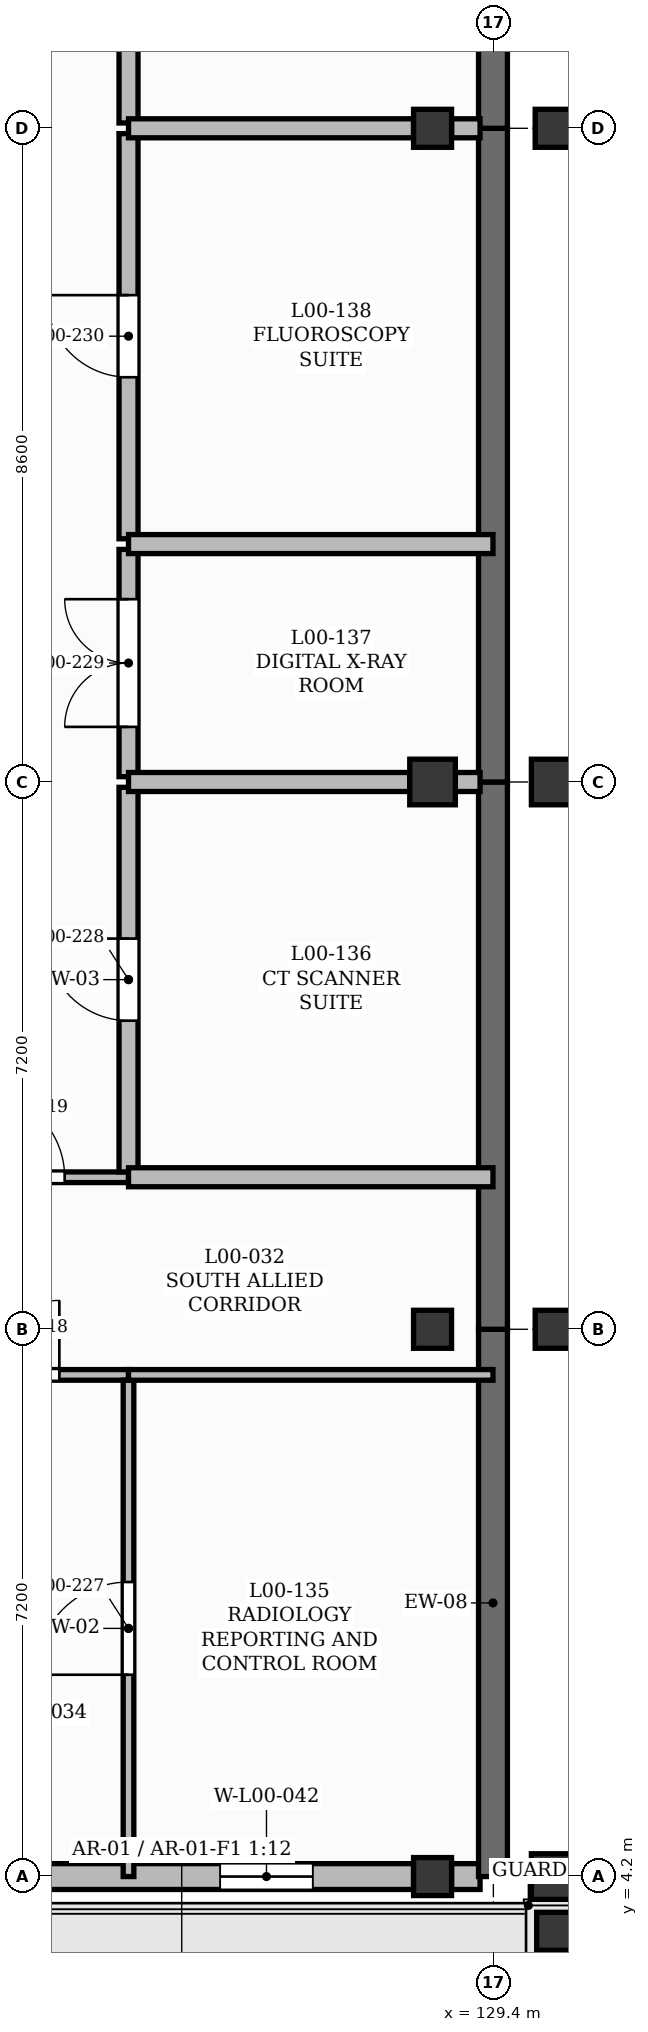
"""IFC4 building model, lengths in metres.
Left out: names, types, materials, properties, quantities, classifications, styles, units other than length and angle.
Written with IfcOpenShell. Run it as: python <this file> out.ifc"""

import sys

from ifc_helpers import new_model, si_unit, direction, frame, frame_2d, origin, origin_2d, place, context, subcontext, project, spatial, rectangle, extrude, element, fill, save


model = new_model("IFC4")
c1 = context("Model", 3, precision=1e-05, world=origin(), true_north=direction((0.0, 1.0)))
c2 = subcontext(c1, "Body", "Model", "MODEL_VIEW")
j1 = project(units=[si_unit("LENGTHUNIT", "METRE"), si_unit("PLANEANGLEUNIT", "RADIAN")], contexts=[c1])
p1 = place(None, origin())
s1 = spatial("IfcSite", under=j1, at=p1, CompositionType="ELEMENT")
p2 = place(p1, origin())
s2 = spatial("IfcBuilding", under=s1, at=p2, CompositionType="ELEMENT")
p3 = place(p2, origin())
s3 = spatial("IfcBuildingStorey", under=s2, at=p3, CompositionType="ELEMENT", Elevation=0.0)
for number, where, z_axis, x_axis in (
    (1, (128.6, 4.2, 0.0), (0.0, 0.0, 1.0), (1.0, 0.0, 0.0)),
    (2, (128.6, 11.4, 0.0), (0.0, 0.0, 1.0), (1.0, 0.0, 0.0)),
):
    element("IfcColumn", number, at=place(p3, frame(where, z_axis=z_axis, x_axis=x_axis)), inside=s3, PredefinedType="COLUMN", context=c2, shape_type="SweptSolid", body=[
        extrude(rectangle(XDim=0.5, YDim=0.5, at=origin_2d()), origin(), (0.0, 0.0, 1.0), 4.2),
    ])
p4 = place(p3, frame((128.6, 18.6, 0.0), z_axis=(0.0, 0.0, 1.0), x_axis=(1.0, 0.0, 0.0)))
e3 = element("IfcColumn", 3, at=p4, inside=s3, PredefinedType="COLUMN", context=c2, shape_type="SweptSolid", body=[
    extrude(rectangle(XDim=0.6, YDim=0.6, at=origin_2d()), origin(), (0.0, 0.0, 1.0), 4.2),
])
p5 = place(p3, frame((128.6, 27.2, 0.0), z_axis=(0.0, 0.0, 1.0), x_axis=(1.0, 0.0, 0.0)))
e4 = element("IfcColumn", 4, at=p5, inside=s3, PredefinedType="COLUMN", context=c2, shape_type="SweptSolid", body=[
    extrude(rectangle(XDim=0.5, YDim=0.5, at=origin_2d()), origin(), (0.0, 0.0, 1.0), 4.2),
])
p6 = place(p3, frame((130.2, 4.2, -0.4), z_axis=(0.0, 0.0, 1.0), x_axis=(1.0, 0.0, 0.0)))
e5 = element("IfcColumn", 5, at=p6, inside=s3, PredefinedType="COLUMN", context=c2, shape_type="SweptSolid", body=[
    extrude(rectangle(XDim=0.6, YDim=0.6, at=origin_2d()), origin(), (0.0, 0.0, 1.0), 4.5),
])
p7 = place(p3, frame((130.2, 11.4, -0.4), z_axis=(0.0, 0.0, 1.0), x_axis=(1.0, 0.0, 0.0)))
e6 = element("IfcColumn", 6, at=p7, inside=s3, PredefinedType="COLUMN", context=c2, shape_type="SweptSolid", body=[
    extrude(rectangle(XDim=0.5, YDim=0.5, at=origin_2d()), origin(), (0.0, 0.0, 1.0), 4.5),
])
p8 = place(p3, frame((130.2, 18.6, -0.4), z_axis=(0.0, 0.0, 1.0), x_axis=(1.0, 0.0, 0.0)))
e7 = element("IfcColumn", 7, at=p8, inside=s3, PredefinedType="COLUMN", context=c2, shape_type="SweptSolid", body=[
    extrude(rectangle(XDim=0.6, YDim=0.6, at=origin_2d()), origin(), (0.0, 0.0, 1.0), 4.5),
])
p9 = place(p3, frame((130.2, 27.2, -0.4), z_axis=(0.0, 0.0, 1.0), x_axis=(1.0, 0.0, 0.0)))
e8 = element("IfcColumn", 8, at=p9, inside=s3, PredefinedType="COLUMN", context=c2, shape_type="SweptSolid", body=[
    extrude(rectangle(XDim=0.5, YDim=0.5, at=origin_2d()), origin(), (0.0, 0.0, 1.0), 4.5),
])
p10 = place(p3, frame((130.22, 3.48, -1.6), z_axis=(0.0, 0.0, 1.0), x_axis=(1.0, 0.0, 0.0)))
e9 = element("IfcColumn", 9, at=p10, inside=s3, PredefinedType="COLUMN", context=c2, shape_type="SweptSolid", body=[
    extrude(rectangle(XDim=0.5, YDim=0.5, at=origin_2d()), origin(), (0.0, 0.0, 1.0), 2.1),
])
p11 = place(p3, frame((122.5, 4.2, 0.0), z_axis=(0.0, 0.0, 1.0), x_axis=(1.0, 0.0, 0.0)))
e10 = element("IfcWall", 10, at=p11, inside=s3, PredefinedType="SOLIDWALL", context=c2, shape_type="SweptSolid", body=[
    extrude(rectangle(XDim=5.85, YDim=0.34, at=frame_2d((2.925, 0.0))), origin(), (0.0, 0.0, 1.0), 3.68),
])
p12 = place(p11, frame((3.305, 0.0, 1.0)))
e11 = element("IfcOpeningElement", 11, at=p12, cuts=e10, PredefinedType="OPENING", context=c2, shape_type="SweptSolid", body=[
    extrude(rectangle(XDim=1.22, YDim=2.2, at=frame_2d((0.61, 1.1))), frame((0.0, 0.18, 0.0), z_axis=(0.0, -1.0, 0.0), x_axis=(1.0, 0.0, 0.0)), (0.0, 0.0, 1.0), 0.36),
])
p13 = place(p3, frame((128.85, 4.2, 0.0), z_axis=(0.0, 0.0, 1.0), x_axis=(1.0, 0.0, 0.0)))
e12 = element("IfcWall", 12, at=p13, inside=s3, PredefinedType="SOLIDWALL", context=c2, shape_type="SweptSolid", body=[
    extrude(rectangle(XDim=0.375, YDim=0.34, at=frame_2d((0.188, 0.0))), origin(), (0.0, 0.0, 1.0), 4.2),
])
p14 = place(p3, frame((129.395, 4.2, 0.0), z_axis=(0.0, 0.0, 1.0), x_axis=(0.0, 1.0, 0.0)))
e13 = element("IfcWall", 13, at=p14, inside=s3, PredefinedType="USERDEFINED", context=c2, shape_type="SweptSolid", body=[
    extrude(rectangle(XDim=7.2, YDim=0.38, at=frame_2d((3.6, 0.0))), origin(), (0.0, 0.0, 1.0), 4.2),
])
p15 = place(p3, frame((129.395, 11.4, 0.0), z_axis=(0.0, 0.0, 1.0), x_axis=(0.0, 1.0, 0.0)))
e14 = element("IfcWall", 14, at=p15, inside=s3, PredefinedType="USERDEFINED", context=c2, shape_type="SweptSolid", body=[
    extrude(rectangle(XDim=7.2, YDim=0.38, at=frame_2d((3.6, 0.0))), origin(), (0.0, 0.0, 1.0), 4.2),
])
p16 = place(p3, frame((129.395, 18.6, 0.0), z_axis=(0.0, 0.0, 1.0), x_axis=(0.0, 1.0, 0.0)))
e15 = element("IfcWall", 15, at=p16, inside=s3, PredefinedType="USERDEFINED", context=c2, shape_type="SweptSolid", body=[
    extrude(rectangle(XDim=8.6, YDim=0.38, at=frame_2d((4.3, 0.0))), origin(), (0.0, 0.0, 1.0), 4.2),
])
p17 = place(p3, frame((129.395, 27.2, 0.0), z_axis=(0.0, 0.0, 1.0), x_axis=(0.0, 1.0, 0.0)))
e16 = element("IfcWall", 16, at=p17, inside=s3, PredefinedType="USERDEFINED", context=c2, shape_type="SweptSolid", body=[
    extrude(rectangle(XDim=9.6, YDim=0.38, at=frame_2d((4.8, 0.0))), origin(), (0.0, 0.0, 1.0), 4.2),
])
p18 = place(p3, frame((121.8, 10.8, 0.0), z_axis=(0.0, 0.0, 1.0), x_axis=(1.0, 0.0, 0.0)))
e17 = element("IfcWall", 17, at=p18, inside=s3, PredefinedType="PARTITIONING", context=c2, shape_type="SweptSolid", body=[
    extrude(rectangle(XDim=2.8, YDim=0.14, at=frame_2d((1.4, 0.0))), origin(), (0.0, 0.0, 1.0), 4.18),
])
p19 = place(p18, frame((0.91, 0.0, 0.0)))
e18 = element("IfcOpeningElement", 18, at=p19, cuts=e17, PredefinedType="OPENING", context=c2, shape_type="SweptSolid", body=[
    extrude(rectangle(XDim=0.98, YDim=2.15, at=frame_2d((0.49, 1.075))), frame((0.0, 0.08, 0.0), z_axis=(0.0, -1.0, 0.0), x_axis=(1.0, 0.0, 0.0)), (0.0, 0.0, 1.0), 0.16),
])
p20 = place(p3, frame((121.8, 13.4, 0.0), z_axis=(0.0, 0.0, 1.0), x_axis=(1.0, 0.0, 0.0)))
e19 = element("IfcWall", 19, at=p20, inside=s3, PredefinedType="PARTITIONING", context=c2, shape_type="SweptSolid", body=[
    extrude(rectangle(XDim=2.8, YDim=0.14, at=frame_2d((1.4, 0.0))), origin(), (0.0, 0.0, 1.0), 4.18),
])
p21 = place(p20, frame((0.84, 0.0, 0.0)))
e20 = element("IfcOpeningElement", 20, at=p21, cuts=e19, PredefinedType="OPENING", context=c2, shape_type="SweptSolid", body=[
    extrude(rectangle(XDim=1.12, YDim=2.15, at=frame_2d((0.56, 1.075))), frame((0.0, 0.08, 0.0), z_axis=(0.0, -1.0, 0.0), x_axis=(1.0, 0.0, 0.0)), (0.0, 0.0, 1.0), 0.16),
])
p22 = place(p3, frame((124.6, 4.2, 0.0), z_axis=(0.0, 0.0, 1.0), x_axis=(0.0, 1.0, 0.0)))
e21 = element("IfcWall", 21, at=p22, inside=s3, PredefinedType="PARTITIONING", context=c2, shape_type="SweptSolid", body=[
    extrude(rectangle(XDim=6.53, YDim=0.14, at=frame_2d((3.265, 0.0))), origin(), (0.0, 0.0, 1.0), 4.18),
])
p23 = place(p22, frame((2.655, 0.0, 0.0)))
e22 = element("IfcOpeningElement", 22, at=p23, cuts=e21, PredefinedType="OPENING", context=c2, shape_type="SweptSolid", body=[
    extrude(rectangle(XDim=1.22, YDim=2.1, at=frame_2d((0.61, 1.05))), frame((0.0, 0.08, 0.0), z_axis=(0.0, -1.0, 0.0), x_axis=(1.0, 0.0, 0.0)), (0.0, 0.0, 1.0), 0.16),
])
p24 = place(p3, frame((124.6, 10.8, 0.0), z_axis=(0.0, 0.0, 1.0), x_axis=(1.0, 0.0, 0.0)))
e23 = element("IfcWall", 23, at=p24, inside=s3, PredefinedType="PARTITIONING", context=c2, shape_type="SweptSolid", body=[
    extrude(rectangle(XDim=4.795, YDim=0.14, at=frame_2d((2.397, 0.0))), origin(), (0.0, 0.0, 1.0), 4.18),
])
p25 = place(p3, frame((124.6, 13.47, 0.0), z_axis=(0.0, 0.0, 1.0), x_axis=(0.0, 1.0, 0.0)))
e24 = element("IfcWall", 24, at=p25, inside=s3, PredefinedType="SOLIDWALL", context=c2, shape_type="SweptSolid", body=[
    extrude(rectangle(XDim=5.06, YDim=0.25, at=frame_2d((2.53, 0.0))), origin(), (0.0, 0.0, 1.0), 4.18),
])
p26 = place(p25, frame((1.99, 0.0, 0.0)))
e25 = element("IfcOpeningElement", 25, at=p26, cuts=e24, PredefinedType="OPENING", context=c2, shape_type="SweptSolid", body=[
    extrude(rectangle(XDim=1.08, YDim=2.15, at=frame_2d((0.54, 1.075))), frame((0.0, 0.135, 0.0), z_axis=(0.0, -1.0, 0.0), x_axis=(1.0, 0.0, 0.0)), (0.0, 0.0, 1.0), 0.27),
])
p27 = place(p3, frame((124.6, 13.4, 0.0), z_axis=(0.0, 0.0, 1.0), x_axis=(1.0, 0.0, 0.0)))
e26 = element("IfcWall", 26, at=p27, inside=s3, PredefinedType="SOLIDWALL", context=c2, shape_type="SweptSolid", body=[
    extrude(rectangle(XDim=4.795, YDim=0.25, at=frame_2d((2.397, 0.0))), origin(), (0.0, 0.0, 1.0), 4.18),
])
p28 = place(p3, frame((124.6, 18.67, 0.0), z_axis=(0.0, 0.0, 1.0), x_axis=(0.0, 1.0, 0.0)))
e27 = element("IfcWall", 27, at=p28, inside=s3, PredefinedType="SOLIDWALL", context=c2, shape_type="SweptSolid", body=[
    extrude(rectangle(XDim=2.99, YDim=0.25, at=frame_2d((1.495, 0.0))), origin(), (0.0, 0.0, 1.0), 4.18),
])
p29 = place(p28, frame((0.655, 0.0, 0.0)))
e28 = element("IfcOpeningElement", 28, at=p29, cuts=e27, PredefinedType="OPENING", context=c2, shape_type="SweptSolid", body=[
    extrude(rectangle(XDim=1.68, YDim=2.3, at=frame_2d((0.84, 1.15))), frame((0.0, 0.135, 0.0), z_axis=(0.0, -1.0, 0.0), x_axis=(1.0, 0.0, 0.0)), (0.0, 0.0, 1.0), 0.27),
])
p30 = place(p3, frame((124.6, 18.6, 0.0), z_axis=(0.0, 0.0, 1.0), x_axis=(1.0, 0.0, 0.0)))
e29 = element("IfcWall", 29, at=p30, inside=s3, PredefinedType="SOLIDWALL", context=c2, shape_type="SweptSolid", body=[
    extrude(rectangle(XDim=3.7, YDim=0.25, at=frame_2d((1.85, 0.0))), origin(), (0.0, 0.0, 1.0), 3.25),
])
p31 = place(p3, frame((128.9, 18.6, 0.0), z_axis=(0.0, 0.0, 1.0), x_axis=(1.0, 0.0, 0.0)))
e30 = element("IfcWall", 30, at=p31, inside=s3, PredefinedType="SOLIDWALL", context=c2, shape_type="SweptSolid", body=[
    extrude(rectangle(XDim=0.325, YDim=0.25, at=frame_2d((0.163, 0.0))), origin(), (0.0, 0.0, 1.0), 4.18),
])
p32 = place(p3, frame((124.6, 21.8, 0.0), z_axis=(0.0, 0.0, 1.0), x_axis=(0.0, 1.0, 0.0)))
e31 = element("IfcWall", 31, at=p32, inside=s3, PredefinedType="SOLIDWALL", context=c2, shape_type="SweptSolid", body=[
    extrude(rectangle(XDim=5.33, YDim=0.25, at=frame_2d((2.665, 0.0))), origin(), (0.0, 0.0, 1.0), 4.18),
])
p33 = place(p32, frame((2.125, 0.0, 0.0)))
e32 = element("IfcOpeningElement", 32, at=p33, cuts=e31, PredefinedType="OPENING", context=c2, shape_type="SweptSolid", body=[
    extrude(rectangle(XDim=1.08, YDim=2.15, at=frame_2d((0.54, 1.075))), frame((0.0, 0.135, 0.0), z_axis=(0.0, -1.0, 0.0), x_axis=(1.0, 0.0, 0.0)), (0.0, 0.0, 1.0), 0.27),
])
p34 = place(p3, frame((124.6, 21.73, 0.0), z_axis=(0.0, 0.0, 1.0), x_axis=(1.0, 0.0, 0.0)))
e33 = element("IfcWall", 33, at=p34, inside=s3, PredefinedType="SOLIDWALL", context=c2, shape_type="SweptSolid", body=[
    extrude(rectangle(XDim=4.795, YDim=0.25, at=frame_2d((2.397, 0.0))), origin(), (0.0, 0.0, 1.0), 4.18),
])
p35 = place(p3, frame((124.6, 27.27, 0.0), z_axis=(0.0, 0.0, 1.0), x_axis=(0.0, 1.0, 0.0)))
e34 = element("IfcWall", 34, at=p35, inside=s3, PredefinedType="SOLIDWALL", context=c2, shape_type="SweptSolid", body=[
    extrude(rectangle(XDim=5.476, YDim=0.25, at=frame_2d((2.738, 0.0))), origin(), (0.0, 0.0, 1.0), 4.18),
])
p36 = place(p35, frame((1.898, 0.0, 0.0)))
e35 = element("IfcOpeningElement", 35, at=p36, cuts=e34, PredefinedType="OPENING", context=c2, shape_type="SweptSolid", body=[
    extrude(rectangle(XDim=1.68, YDim=2.3, at=frame_2d((0.84, 1.15))), frame((0.0, 0.135, 0.0), z_axis=(0.0, -1.0, 0.0), x_axis=(1.0, 0.0, 0.0)), (0.0, 0.0, 1.0), 0.27),
])
p37 = place(p3, frame((124.6, 27.2, 0.0), z_axis=(0.0, 0.0, 1.0), x_axis=(1.0, 0.0, 0.0)))
e36 = element("IfcWall", 36, at=p37, inside=s3, PredefinedType="SOLIDWALL", context=c2, shape_type="SweptSolid", body=[
    extrude(rectangle(XDim=3.75, YDim=0.25, at=frame_2d((1.875, 0.0))), origin(), (0.0, 0.0, 1.0), 3.6),
])
p38 = place(p3, frame((128.85, 27.2, 0.0), z_axis=(0.0, 0.0, 1.0), x_axis=(1.0, 0.0, 0.0)))
e37 = element("IfcWall", 37, at=p38, inside=s3, PredefinedType="SOLIDWALL", context=c2, shape_type="SweptSolid", body=[
    extrude(rectangle(XDim=0.375, YDim=0.25, at=frame_2d((0.188, 0.0))), origin(), (0.0, 0.0, 1.0), 4.18),
])
p39 = place(p12, origin())
e38 = element("IfcWindow", 38, at=p39, inside=s3, PartitioningType="SINGLE_PANEL", PredefinedType="WINDOW", context=c2, shape_type="SweptSolid", body=[
    extrude(rectangle(XDim=1.22, YDim=2.2, at=frame_2d((0.61, 1.1))), frame((0.0, 0.03, 0.0), z_axis=(0.0, -1.0, 0.0), x_axis=(1.0, 0.0, 0.0)), (0.0, 0.0, 1.0), 0.06),
])
fill(e11, e38)
p40 = place(p19, origin())
e39 = element("IfcDoor", 39, at=p40, inside=s3, OperationType="SINGLE_SWING_RIGHT", PredefinedType="DOOR", context=c2, shape_type="SweptSolid", body=[
    extrude(rectangle(XDim=0.98, YDim=2.15, at=frame_2d((0.49, 1.075))), frame((0.0, 0.025, 0.0), z_axis=(0.0, -1.0, 0.0), x_axis=(1.0, 0.0, 0.0)), (0.0, 0.0, 1.0), 0.05),
])
fill(e18, e39)
p41 = place(p21, origin())
e40 = element("IfcDoor", 40, at=p41, inside=s3, OperationType="SINGLE_SWING_LEFT", PredefinedType="DOOR", context=c2, shape_type="SweptSolid", body=[
    extrude(rectangle(XDim=1.12, YDim=2.15, at=frame_2d((0.56, 1.075))), frame((0.0, 0.025, 0.0), z_axis=(0.0, -1.0, 0.0), x_axis=(1.0, 0.0, 0.0)), (0.0, 0.0, 1.0), 0.05),
])
fill(e20, e40)
p42 = place(p23, origin())
e41 = element("IfcDoor", 41, at=p42, inside=s3, OperationType="SINGLE_SWING_LEFT", PredefinedType="DOOR", context=c2, shape_type="SweptSolid", body=[
    extrude(rectangle(XDim=1.22, YDim=2.1, at=frame_2d((0.61, 1.05))), frame((0.0, 0.025, 0.0), z_axis=(0.0, -1.0, 0.0), x_axis=(1.0, 0.0, 0.0)), (0.0, 0.0, 1.0), 0.05),
])
fill(e22, e41)
p43 = place(p26, origin())
e42 = element("IfcDoor", 42, at=p43, inside=s3, OperationType="SINGLE_SWING_RIGHT", PredefinedType="DOOR", context=c2, shape_type="SweptSolid", body=[
    extrude(rectangle(XDim=1.08, YDim=2.15, at=frame_2d((0.54, 1.075))), frame((0.0, 0.025, 0.0), z_axis=(0.0, -1.0, 0.0), x_axis=(1.0, 0.0, 0.0)), (0.0, 0.0, 1.0), 0.05),
])
fill(e25, e42)
p44 = place(p29, origin())
e43 = element("IfcDoor", 43, at=p44, inside=s3, OperationType="DOUBLE_DOOR_SINGLE_SWING", PredefinedType="DOOR", context=c2, shape_type="SweptSolid", body=[
    extrude(rectangle(XDim=1.68, YDim=2.3, at=frame_2d((0.84, 1.15))), frame((0.0, 0.025, 0.0), z_axis=(0.0, -1.0, 0.0), x_axis=(1.0, 0.0, 0.0)), (0.0, 0.0, 1.0), 0.05),
])
fill(e28, e43)
p45 = place(p33, origin())
e44 = element("IfcDoor", 44, at=p45, inside=s3, OperationType="SINGLE_SWING_RIGHT", PredefinedType="DOOR", context=c2, shape_type="SweptSolid", body=[
    extrude(rectangle(XDim=1.08, YDim=2.15, at=frame_2d((0.54, 1.075))), frame((0.0, 0.025, 0.0), z_axis=(0.0, -1.0, 0.0), x_axis=(1.0, 0.0, 0.0)), (0.0, 0.0, 1.0), 0.05),
])
fill(e32, e44)
save(model, sys.argv[1])
